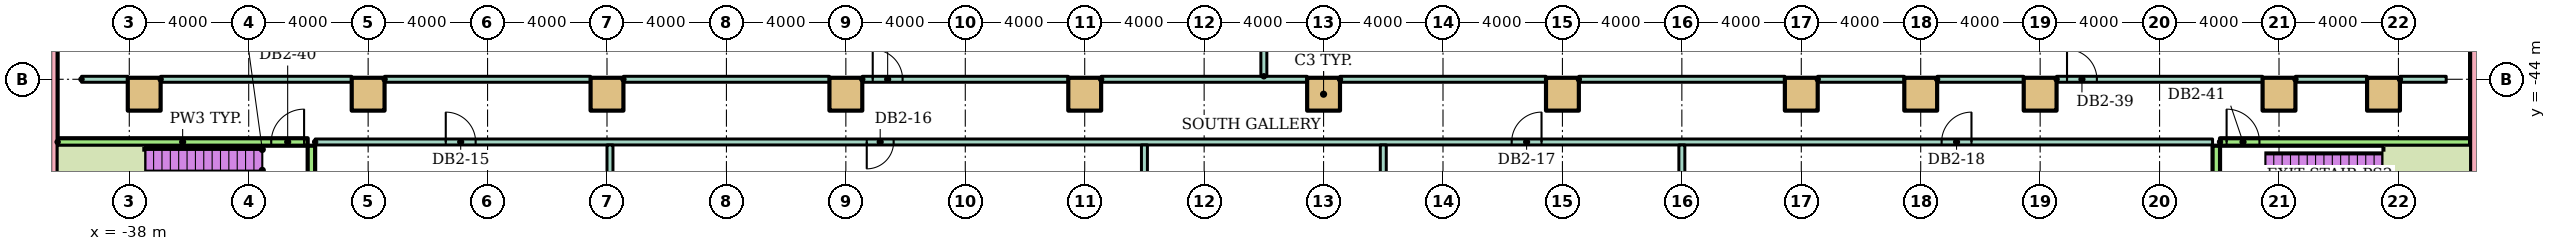
"""IFC4 building model, lengths in metres.
Left out: names, types, materials, properties, quantities, classifications, styles, units other than length and angle.
Written with IfcOpenShell. Run it as: python <this file> out.ifc"""

import sys

from ifc_helpers import new_model, si_unit, direction, frame, frame_2d, origin, origin_2d, place, context, subcontext, project, spatial, rectangle, extrude, element, fill, save


model = new_model("IFC4")
c1 = context("Model", 3, precision=1e-05, world=origin(), true_north=direction((0.0, 1.0)))
c2 = subcontext(c1, "Body", "Model", "MODEL_VIEW")
j1 = project(units=[si_unit("LENGTHUNIT", "METRE"), si_unit("PLANEANGLEUNIT", "RADIAN")], contexts=[c1])
p1 = place(None, origin())
s1 = spatial("IfcSite", under=j1, at=p1, CompositionType="ELEMENT")
p2 = place(p1, origin())
s2 = spatial("IfcBuilding", under=s1, at=p2, CompositionType="ELEMENT")
p3 = place(p2, frame((0.0, 0.0, -10.0)))
s3 = spatial("IfcBuildingStorey", under=s2, at=p3, CompositionType="ELEMENT", Elevation=-10.0)
for number, where, z_axis, x_axis in (
    (1, (-40.7, -50.4, -0.3), (0.0, 0.0, 1.0), (0.0, 1.0, 0.0)),
    (2, (40.7, -50.4, -0.3), (0.0, 0.0, 1.0), (0.0, 1.0, 0.0)),
):
    element("IfcWall", number, at=place(p3, frame(where, z_axis=z_axis, x_axis=x_axis)), inside=s3, PredefinedType="SOLIDWALL", context=c2, shape_type="SweptSolid", body=[
        extrude(rectangle(XDim=70.8, YDim=0.6, at=frame_2d((35.4, 0.0))), origin(), (0.0, 0.0, 1.0), 4.95),
    ])
for number, where in (
    (3, (-37.5, -44.5, -0.3)),
    (4, (-30.0, -44.5, -0.3)),
    (5, (-22.0, -44.5, -0.3)),
    (6, (-14.0, -44.5, -0.3)),
    (7, (-6.0, -44.5, -0.3)),
    (8, (2.0, -44.5, -0.3)),
    (9, (10.0, -44.5, -0.3)),
    (10, (18.0, -44.5, -0.3)),
    (11, (22.0, -44.5, -0.3)),
    (12, (26.0, -44.5, -0.3)),
    (13, (34.0, -44.5, -0.3)),
    (14, (37.5, -44.5, -0.3)),
):
    element("IfcColumn", number, at=place(p3, frame(where)), inside=s3, PredefinedType="COLUMN", context=c2, shape_type="SweptSolid", body=[
        extrude(rectangle(XDim=1.1, YDim=1.1, at=origin_2d()), origin(), (0.0, 0.0, 1.0), 5.3),
    ])
p4 = place(p3, frame((-31.775, -46.1, 0.0)))
e15 = element("IfcWall", 15, at=p4, inside=s3, PredefinedType="PARTITIONING", context=c2, shape_type="SweptSolid", body=[
    extrude(rectangle(XDim=63.55, YDim=0.2, at=frame_2d((31.775, 0.0))), origin(), (0.0, 0.0, 1.0), 4.65),
])
p5 = place(p4, frame((4.375, 0.0, 0.0)))
e16 = element("IfcOpeningElement", 16, at=p5, cuts=e15, PredefinedType="OPENING", context=c2, shape_type="SweptSolid", body=[
    extrude(rectangle(XDim=1.0, YDim=2.1, at=frame_2d((0.5, 1.05))), frame((0.0, 0.11, 0.0), z_axis=(0.0, -1.0, 0.0), x_axis=(1.0, 0.0, 0.0)), (0.0, 0.0, 1.0), 0.22),
])
p6 = place(p4, frame((18.475, 0.0, 0.0)))
e17 = element("IfcOpeningElement", 17, at=p6, cuts=e15, PredefinedType="OPENING", context=c2, shape_type="SweptSolid", body=[
    extrude(rectangle(XDim=0.9, YDim=2.1, at=frame_2d((0.45, 1.05))), frame((0.0, 0.11, 0.0), z_axis=(0.0, -1.0, 0.0), x_axis=(1.0, 0.0, 0.0)), (0.0, 0.0, 1.0), 0.22),
])
p7 = place(p4, frame((40.075, 0.0, 0.0)))
e18 = element("IfcOpeningElement", 18, at=p7, cuts=e15, PredefinedType="OPENING", context=c2, shape_type="SweptSolid", body=[
    extrude(rectangle(XDim=1.0, YDim=2.1, at=frame_2d((0.5, 1.05))), frame((0.0, 0.11, 0.0), z_axis=(0.0, -1.0, 0.0), x_axis=(1.0, 0.0, 0.0)), (0.0, 0.0, 1.0), 0.22),
])
p8 = place(p4, frame((54.475, 0.0, 0.0)))
e19 = element("IfcOpeningElement", 19, at=p8, cuts=e15, PredefinedType="OPENING", context=c2, shape_type="SweptSolid", body=[
    extrude(rectangle(XDim=1.0, YDim=2.1, at=frame_2d((0.5, 1.05))), frame((0.0, 0.11, 0.0), z_axis=(0.0, -1.0, 0.0), x_axis=(1.0, 0.0, 0.0)), (0.0, 0.0, 1.0), 0.22),
])
p9 = place(p3, frame((-40.4, -46.1, 0.0)))
e20 = element("IfcWall", 20, at=p9, inside=s3, PredefinedType="SOLIDWALL", context=c2, shape_type="SweptSolid", body=[
    extrude(rectangle(XDim=8.375, YDim=0.25, at=frame_2d((4.188, 0.0))), origin(), (0.0, 0.0, 1.0), 4.65),
])
p10 = place(p9, frame((7.155, 0.0, 0.0)))
e21 = element("IfcOpeningElement", 21, at=p10, cuts=e20, PredefinedType="OPENING", context=c2, shape_type="SweptSolid", body=[
    extrude(rectangle(XDim=1.1, YDim=2.1, at=frame_2d((0.55, 1.05))), frame((0.0, 0.135, 0.0), z_axis=(0.0, -1.0, 0.0), x_axis=(1.0, 0.0, 0.0)), (0.0, 0.0, 1.0), 0.27),
])
p11 = place(p3, frame((32.025, -46.1, 0.0)))
e22 = element("IfcWall", 22, at=p11, inside=s3, PredefinedType="SOLIDWALL", context=c2, shape_type="SweptSolid", body=[
    extrude(rectangle(XDim=8.375, YDim=0.25, at=frame_2d((4.188, 0.0))), origin(), (0.0, 0.0, 1.0), 4.65),
])
p12 = place(p11, frame((0.22, 0.0, 0.0)))
e23 = element("IfcOpeningElement", 23, at=p12, cuts=e22, PredefinedType="OPENING", context=c2, shape_type="SweptSolid", body=[
    extrude(rectangle(XDim=1.1, YDim=2.1, at=frame_2d((0.55, 1.05))), frame((0.0, 0.135, 0.0), z_axis=(0.0, -1.0, 0.0), x_axis=(1.0, 0.0, 0.0)), (0.0, 0.0, 1.0), 0.27),
])
p13 = place(p3, frame((-39.6, -44.0, 0.0)))
e24 = element("IfcWall", 24, at=p13, inside=s3, PredefinedType="PARTITIONING", context=c2, shape_type="SweptSolid", body=[
    extrude(rectangle(XDim=1.55, YDim=0.2, at=frame_2d((0.775, 0.0))), origin(), (0.0, 0.0, 1.0), 4.65),
])
p14 = place(p3, frame((-36.95, -44.0, 0.0)))
e25 = element("IfcWall", 25, at=p14, inside=s3, PredefinedType="PARTITIONING", context=c2, shape_type="SweptSolid", body=[
    extrude(rectangle(XDim=6.4, YDim=0.2, at=frame_2d((3.2, 0.0))), origin(), (0.0, 0.0, 1.0), 4.65),
])
for number, where in (
    (26, (-29.45, -44.0, 0.0)),
    (27, (-21.45, -44.0, 0.0)),
):
    element("IfcWall", number, at=place(p3, frame(where)), inside=s3, PredefinedType="PARTITIONING", context=c2, shape_type="SweptSolid", body=[
        extrude(rectangle(XDim=6.9, YDim=0.2, at=frame_2d((3.45, 0.0))), origin(), (0.0, 0.0, 1.0), 4.65),
    ])
p15 = place(p3, frame((-13.45, -44.0, 0.0)))
e28 = element("IfcWall", 28, at=p15, inside=s3, PredefinedType="PARTITIONING", context=c2, shape_type="SweptSolid", body=[
    extrude(rectangle(XDim=6.9, YDim=0.2, at=frame_2d((3.45, 0.0))), origin(), (0.0, 0.0, 1.0), 4.65),
])
p16 = place(p15, frame((0.35, 0.0, 0.0)))
e29 = element("IfcOpeningElement", 29, at=p16, cuts=e28, PredefinedType="OPENING", context=c2, shape_type="SweptSolid", body=[
    extrude(rectangle(XDim=1.0, YDim=2.1, at=frame_2d((0.5, 1.05))), frame((0.0, 0.11, 0.0), z_axis=(0.0, -1.0, 0.0), x_axis=(1.0, 0.0, 0.0)), (0.0, 0.0, 1.0), 0.22),
])
for number, where in (
    (30, (-5.45, -44.0, 0.0)),
    (31, (2.55, -44.0, 0.0)),
    (32, (10.55, -44.0, 0.0)),
):
    element("IfcWall", number, at=place(p3, frame(where)), inside=s3, PredefinedType="PARTITIONING", context=c2, shape_type="SweptSolid", body=[
        extrude(rectangle(XDim=6.9, YDim=0.2, at=frame_2d((3.45, 0.0))), origin(), (0.0, 0.0, 1.0), 4.65),
    ])
for number, where in (
    (33, (18.55, -44.0, 0.0)),
    (34, (22.55, -44.0, 0.0)),
):
    element("IfcWall", number, at=place(p3, frame(where)), inside=s3, PredefinedType="PARTITIONING", context=c2, shape_type="SweptSolid", body=[
        extrude(rectangle(XDim=2.9, YDim=0.2, at=frame_2d((1.45, 0.0))), origin(), (0.0, 0.0, 1.0), 4.65),
    ])
p17 = place(p3, frame((26.55, -44.0, 0.0)))
e35 = element("IfcWall", 35, at=p17, inside=s3, PredefinedType="PARTITIONING", context=c2, shape_type="SweptSolid", body=[
    extrude(rectangle(XDim=6.9, YDim=0.2, at=frame_2d((3.45, 0.0))), origin(), (0.0, 0.0, 1.0), 4.65),
])
p18 = place(p17, frame((0.35, 0.0, 0.0)))
e36 = element("IfcOpeningElement", 36, at=p18, cuts=e35, PredefinedType="OPENING", context=c2, shape_type="SweptSolid", body=[
    extrude(rectangle(XDim=1.0, YDim=2.1, at=frame_2d((0.5, 1.05))), frame((0.0, 0.11, 0.0), z_axis=(0.0, -1.0, 0.0), x_axis=(1.0, 0.0, 0.0)), (0.0, 0.0, 1.0), 0.22),
])
p19 = place(p3, frame((34.55, -44.0, 0.0)))
e37 = element("IfcWall", 37, at=p19, inside=s3, PredefinedType="PARTITIONING", context=c2, shape_type="SweptSolid", body=[
    extrude(rectangle(XDim=2.4, YDim=0.2, at=frame_2d((1.2, 0.0))), origin(), (0.0, 0.0, 1.0), 4.65),
])
p20 = place(p3, frame((38.05, -44.0, 0.0)))
e38 = element("IfcWall", 38, at=p20, inside=s3, PredefinedType="PARTITIONING", context=c2, shape_type="SweptSolid", body=[
    extrude(rectangle(XDim=1.55, YDim=0.2, at=frame_2d((0.775, 0.0))), origin(), (0.0, 0.0, 1.0), 4.65),
])
p21 = place(p3, frame((-31.9, -50.4, 0.0), z_axis=(0.0, 0.0, 1.0), x_axis=(0.0, 1.0, 0.0)))
e39 = element("IfcWall", 39, at=p21, inside=s3, PredefinedType="SOLIDWALL", context=c2, shape_type="SweptSolid", body=[
    extrude(rectangle(XDim=4.175, YDim=0.25, at=frame_2d((2.087, 0.0))), origin(), (0.0, 0.0, 1.0), 4.65),
])
p22 = place(p3, frame((-21.9, -48.95, 0.0), z_axis=(0.0, 0.0, 1.0), x_axis=(0.0, 1.0, 0.0)))
e40 = element("IfcWall", 40, at=p22, inside=s3, PredefinedType="PARTITIONING", context=c2, shape_type="SweptSolid", body=[
    extrude(rectangle(XDim=2.75, YDim=0.2, at=frame_2d((1.375, 0.0))), origin(), (0.0, 0.0, 1.0), 4.65),
])
p23 = place(p3, frame((-4.0, -49.6, 0.0), z_axis=(0.0, 0.0, 1.0), x_axis=(0.0, 1.0, 0.0)))
e41 = element("IfcWall", 41, at=p23, inside=s3, PredefinedType="PARTITIONING", context=c2, shape_type="SweptSolid", body=[
    extrude(rectangle(XDim=3.4, YDim=0.2, at=frame_2d((1.7, 0.0))), origin(), (0.0, 0.0, 1.0), 4.65),
])
p24 = place(p3, frame((0.0, -43.9, 0.0), z_axis=(0.0, 0.0, 1.0), x_axis=(0.0, 1.0, 0.0)))
e42 = element("IfcWall", 42, at=p24, inside=s3, PredefinedType="PARTITIONING", context=c2, shape_type="SweptSolid", body=[
    extrude(rectangle(XDim=21.8, YDim=0.2, at=frame_2d((10.9, 0.0))), origin(), (0.0, 0.0, 1.0), 4.65),
])
for number, where, z_axis, x_axis in (
    (43, (4.0, -49.6, 0.0), (0.0, 0.0, 1.0), (0.0, 1.0, 0.0)),
    (44, (14.0, -49.6, 0.0), (0.0, 0.0, 1.0), (0.0, 1.0, 0.0)),
):
    element("IfcWall", number, at=place(p3, frame(where, z_axis=z_axis, x_axis=x_axis)), inside=s3, PredefinedType="PARTITIONING", context=c2, shape_type="SweptSolid", body=[
        extrude(rectangle(XDim=3.4, YDim=0.2, at=frame_2d((1.7, 0.0))), origin(), (0.0, 0.0, 1.0), 4.65),
    ])
p25 = place(p3, frame((31.9, -50.4, 0.0), z_axis=(0.0, 0.0, 1.0), x_axis=(0.0, 1.0, 0.0)))
e45 = element("IfcWall", 45, at=p25, inside=s3, PredefinedType="SOLIDWALL", context=c2, shape_type="SweptSolid", body=[
    extrude(rectangle(XDim=4.175, YDim=0.25, at=frame_2d((2.087, 0.0))), origin(), (0.0, 0.0, 1.0), 4.65),
])
p26 = place(p5, origin())
e46 = element("IfcDoor", 46, at=p26, inside=s3, OperationType="SINGLE_SWING_LEFT", PredefinedType="DOOR", context=c2, shape_type="SweptSolid", body=[
    extrude(rectangle(XDim=1.0, YDim=2.1, at=frame_2d((0.5, 1.05))), frame((0.0, 0.025, 0.0), z_axis=(0.0, -1.0, 0.0), x_axis=(1.0, 0.0, 0.0)), (0.0, 0.0, 1.0), 0.05),
])
fill(e16, e46)
p27 = place(p6, frame((0.9, 0.0, 0.0), z_axis=(0.0, 0.0, 1.0), x_axis=(-1.0, 0.0, 0.0)))
e47 = element("IfcDoor", 47, at=p27, inside=s3, OperationType="SINGLE_SWING_LEFT", PredefinedType="DOOR", context=c2, shape_type="SweptSolid", body=[
    extrude(rectangle(XDim=0.9, YDim=2.1, at=frame_2d((0.45, 1.05))), frame((0.0, 0.025, 0.0), z_axis=(0.0, -1.0, 0.0), x_axis=(1.0, 0.0, 0.0)), (0.0, 0.0, 1.0), 0.05),
])
fill(e17, e47)
p28 = place(p7, origin())
e48 = element("IfcDoor", 48, at=p28, inside=s3, OperationType="SINGLE_SWING_RIGHT", PredefinedType="DOOR", context=c2, shape_type="SweptSolid", body=[
    extrude(rectangle(XDim=1.0, YDim=2.1, at=frame_2d((0.5, 1.05))), frame((0.0, 0.025, 0.0), z_axis=(0.0, -1.0, 0.0), x_axis=(1.0, 0.0, 0.0)), (0.0, 0.0, 1.0), 0.05),
])
fill(e18, e48)
p29 = place(p8, origin())
e49 = element("IfcDoor", 49, at=p29, inside=s3, OperationType="SINGLE_SWING_RIGHT", PredefinedType="DOOR", context=c2, shape_type="SweptSolid", body=[
    extrude(rectangle(XDim=1.0, YDim=2.1, at=frame_2d((0.5, 1.05))), frame((0.0, 0.025, 0.0), z_axis=(0.0, -1.0, 0.0), x_axis=(1.0, 0.0, 0.0)), (0.0, 0.0, 1.0), 0.05),
])
fill(e19, e49)
p30 = place(p16, origin())
e50 = element("IfcDoor", 50, at=p30, inside=s3, OperationType="SINGLE_SWING_LEFT", PredefinedType="DOOR", context=c2, shape_type="SweptSolid", body=[
    extrude(rectangle(XDim=1.0, YDim=2.1, at=frame_2d((0.5, 1.05))), frame((0.0, 0.025, 0.0), z_axis=(0.0, -1.0, 0.0), x_axis=(1.0, 0.0, 0.0)), (0.0, 0.0, 1.0), 0.05),
])
fill(e29, e50)
p31 = place(p18, origin())
e51 = element("IfcDoor", 51, at=p31, inside=s3, OperationType="SINGLE_SWING_LEFT", PredefinedType="DOOR", context=c2, shape_type="SweptSolid", body=[
    extrude(rectangle(XDim=1.0, YDim=2.1, at=frame_2d((0.5, 1.05))), frame((0.0, 0.025, 0.0), z_axis=(0.0, -1.0, 0.0), x_axis=(1.0, 0.0, 0.0)), (0.0, 0.0, 1.0), 0.05),
])
fill(e36, e51)
p32 = place(p10, origin())
e52 = element("IfcDoor", 52, at=p32, inside=s3, OperationType="SINGLE_SWING_RIGHT", PredefinedType="DOOR", context=c2, shape_type="SweptSolid", body=[
    extrude(rectangle(XDim=1.1, YDim=2.1, at=frame_2d((0.55, 1.05))), frame((0.0, 0.025, 0.0), z_axis=(0.0, -1.0, 0.0), x_axis=(1.0, 0.0, 0.0)), (0.0, 0.0, 1.0), 0.05),
])
fill(e21, e52)
p33 = place(p12, origin())
e53 = element("IfcDoor", 53, at=p33, inside=s3, OperationType="SINGLE_SWING_LEFT", PredefinedType="DOOR", context=c2, shape_type="SweptSolid", body=[
    extrude(rectangle(XDim=1.1, YDim=2.1, at=frame_2d((0.55, 1.05))), frame((0.0, 0.025, 0.0), z_axis=(0.0, -1.0, 0.0), x_axis=(1.0, 0.0, 0.0)), (0.0, 0.0, 1.0), 0.05),
])
fill(e23, e53)
save(model, sys.argv[1])
